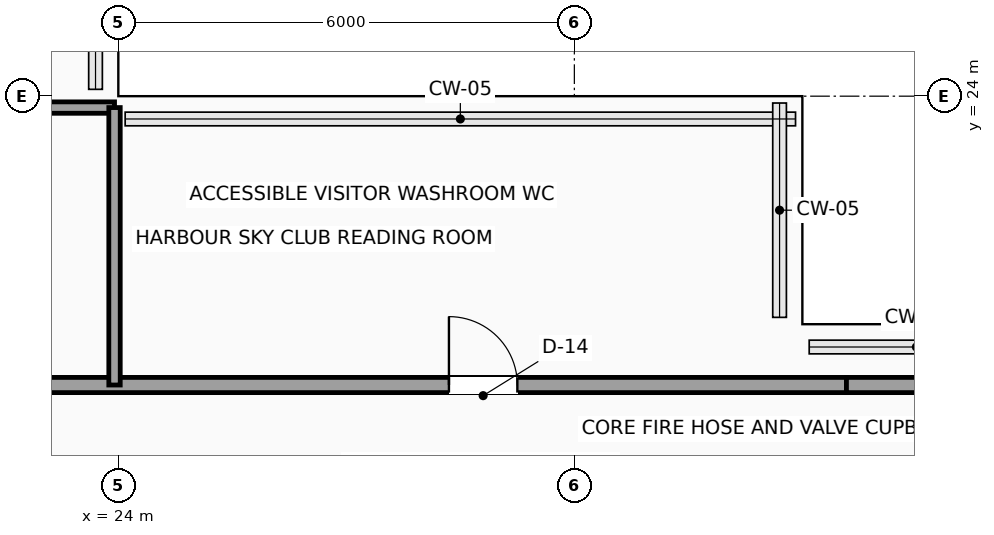
"""IFC4 building model, lengths in metres.
Left out: names, types, materials, properties, quantities, classifications, styles, units other than length and angle.
Written with IfcOpenShell. Run it as: python <this file> out.ifc"""

import sys

from ifc_helpers import new_model, si_unit, direction, frame, frame_2d, origin, place, context, subcontext, project, spatial, rectangle, extrude, element, fill, save


model = new_model("IFC4")
c1 = context("Model", 3, precision=1e-05, world=origin(), true_north=direction((0.0, 1.0)))
c2 = subcontext(c1, "Body", "Model", "MODEL_VIEW")
j1 = project(units=[si_unit("LENGTHUNIT", "METRE"), si_unit("PLANEANGLEUNIT", "RADIAN")], contexts=[c1])
p1 = place(None, origin())
s1 = spatial("IfcSite", under=j1, at=p1, CompositionType="ELEMENT")
p2 = place(p1, origin())
s2 = spatial("IfcBuilding", under=s1, at=p2, CompositionType="ELEMENT")
p3 = place(p2, frame((0.0, 0.0, 257.2)))
s3 = spatial("IfcBuildingStorey", under=s2, at=p3, CompositionType="ELEMENT", Elevation=257.2)
p4 = place(p3, frame((20.45, 20.2, 0.0), z_axis=(0.0, 0.0, 1.0), x_axis=(1.0, 0.0, 0.0)))
e1 = element("IfcWall", 1, at=p4, inside=s3, PredefinedType="SOLIDWALL", context=c2, shape_type="SweptSolid", body=[
    extrude(rectangle(XDim=13.13, YDim=0.2, at=frame_2d((6.565, 0.0))), origin(), (0.0, 0.0, 1.0), 3.3),
])
p5 = place(p4, frame((7.9, 0.0, 0.0)))
e2 = element("IfcOpeningElement", 2, at=p5, cuts=e1, PredefinedType="OPENING", context=c2, shape_type="SweptSolid", body=[
    extrude(rectangle(XDim=0.9, YDim=2.1, at=frame_2d((0.45, 1.05))), frame((0.0, 0.11, 0.0), z_axis=(0.0, -1.0, 0.0), x_axis=(1.0, 0.0, 0.0)), (0.0, 0.0, 1.0), 0.22),
])
p6 = place(p3, frame((33.58, 20.2, 0.0), z_axis=(0.0, 0.0, 1.0), x_axis=(1.0, 0.0, 0.0)))
e3 = element("IfcWall", 3, at=p6, inside=s3, PredefinedType="SOLIDWALL", context=c2, shape_type="SweptSolid", body=[
    extrude(rectangle(XDim=2.12, YDim=0.2, at=frame_2d((1.06, 0.0))), origin(), (0.0, 0.0, 1.0), 3.3),
])
p7 = place(p3, frame((20.45, 23.85, 0.0), z_axis=(0.0, 0.0, 1.0), x_axis=(1.0, 0.0, 0.0)))
e4 = element("IfcWall", 4, at=p7, inside=s3, PredefinedType="PARTITIONING", context=c2, shape_type="SweptSolid", body=[
    extrude(rectangle(XDim=3.5, YDim=0.15, at=frame_2d((1.75, 0.0))), origin(), (0.0, 0.0, 1.0), 3.3),
])
p8 = place(p3, frame((23.95, 20.2, 0.0), z_axis=(0.0, 0.0, 1.0), x_axis=(0.0, 1.0, 0.0)))
e5 = element("IfcWall", 5, at=p8, inside=s3, PredefinedType="PARTITIONING", context=c2, shape_type="SweptSolid", body=[
    extrude(rectangle(XDim=3.65, YDim=0.15, at=frame_2d((1.825, 0.0))), origin(), (0.0, 0.0, 1.0), 3.3),
])
p9 = place(p5, origin())
e6 = element("IfcDoor", 6, at=p9, inside=s3, OperationType="SINGLE_SWING_LEFT", PredefinedType="DOOR", context=c2, shape_type="SweptSolid", body=[
    extrude(rectangle(XDim=0.9, YDim=2.1, at=frame_2d((0.45, 1.05))), frame((0.0, 0.025, 0.0), z_axis=(0.0, -1.0, 0.0), x_axis=(1.0, 0.0, 0.0)), (0.0, 0.0, 1.0), 0.05),
])
fill(e2, e6)
save(model, sys.argv[1])
